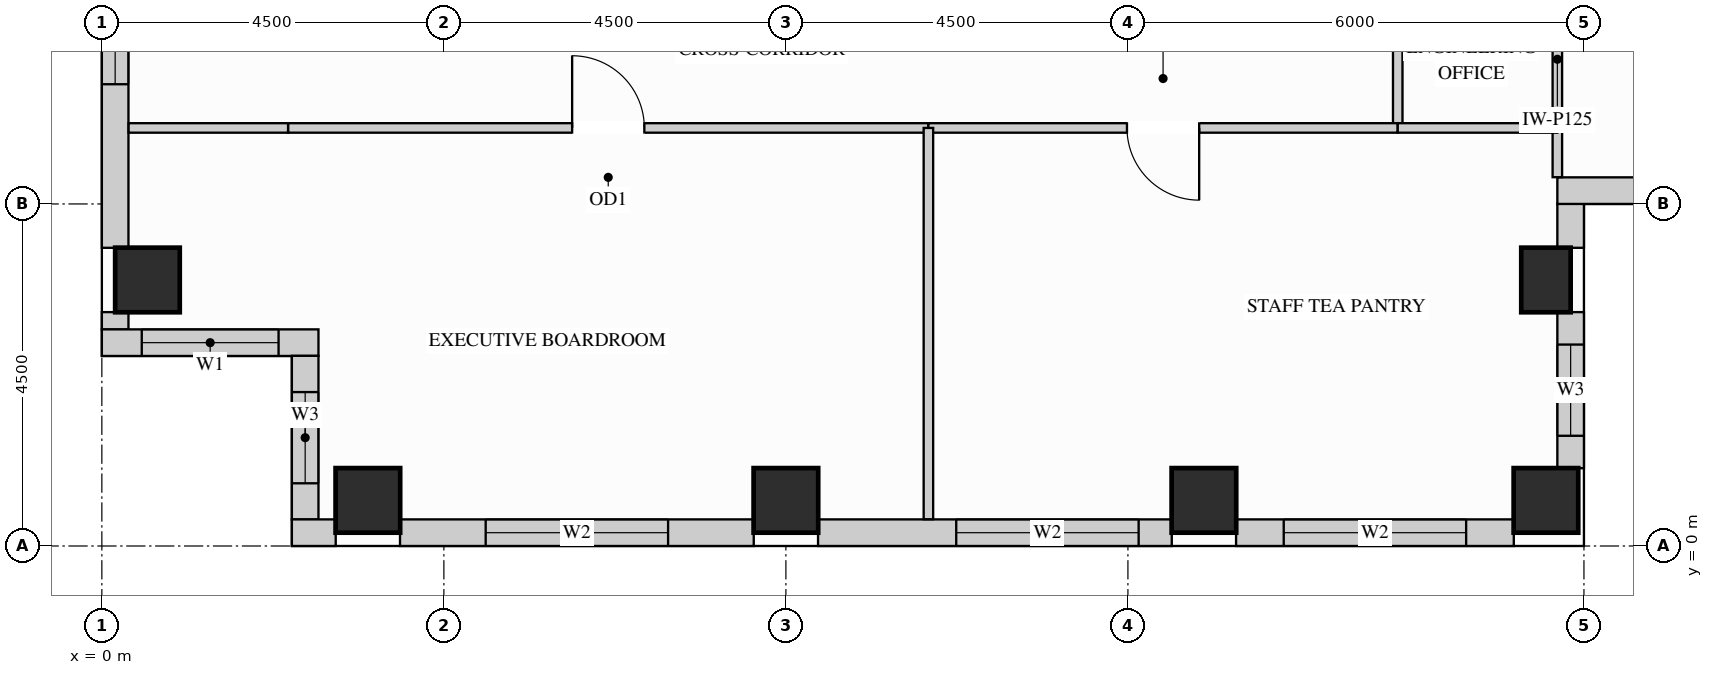
"""IFC4 building model, lengths in metres.
Left out: names, types, materials, properties, quantities, classifications, styles, units other than length and angle.
Written with IfcOpenShell. Run it as: python <this file> out.ifc"""

import sys

from ifc_helpers import new_model, si_unit, direction, frame, frame_2d, origin, origin_2d, place, context, subcontext, project, spatial, rectangle, extrude, source, transform, mapped, element, fill, save


model = new_model("IFC4")
c1 = context("Model", 3, precision=1e-05, world=origin(), true_north=direction((0.0, 1.0)))
c2 = subcontext(c1, "Body", "Model", "MODEL_VIEW")
j1 = project(units=[si_unit("LENGTHUNIT", "METRE"), si_unit("PLANEANGLEUNIT", "RADIAN")], contexts=[c1])
p1 = place(None, origin())
s1 = spatial("IfcSite", under=j1, at=p1, CompositionType="ELEMENT")
p2 = place(p1, origin())
s2 = spatial("IfcBuilding", under=s1, at=p2, CompositionType="ELEMENT")
p3 = place(p2, frame((0.0, 0.0, 216.0)))
s3 = spatial("IfcBuildingStorey", under=s2, at=p3, CompositionType="ELEMENT", Elevation=216.0)
m1 = source(origin(), c2, "Body", "SweptSolid", [
    extrude(rectangle(XDim=0.65, YDim=0.85, at=origin_2d()), origin(), (0.0, 0.0, 1.0), 3.4),
])
p4 = place(p3, frame((19.0, 3.5, 0.0), z_axis=(0.0, 0.0, 1.0), x_axis=(1.0, 0.0, 0.0)))
e1 = element("IfcColumn", 1, at=p4, inside=s3, PredefinedType="COLUMN", context=c2, shape_type="MappedRepresentation", body=[
    mapped(m1, transform((0.0, 0.0, 0.0), x_axis=(1.0, 0.0, 0.0), y_axis=(0.0, 1.0, 0.0), z_axis=(0.0, 0.0, 1.0))),
])
m2 = source(origin(), c2, "Body", "SweptSolid", [
    extrude(rectangle(XDim=0.85, YDim=0.85, at=origin_2d()), origin(), (0.0, 0.0, 1.0), 3.4),
])
for number, where, z_axis, x_axis in (
    (2, (14.5, 0.6, 0.0), (0.0, 0.0, 1.0), (1.0, 0.0, 0.0)),
    (3, (19.0, 0.6, 0.0), (0.0, 0.0, 1.0), (1.0, 0.0, 0.0)),
    (4, (3.5, 0.6, 0.0), (0.0, 0.0, 1.0), (1.0, 0.0, 0.0)),
    (5, (9.0, 0.6, 0.0), (0.0, 0.0, 1.0), (1.0, 0.0, 0.0)),
    (6, (0.6, 3.5, 0.0), (0.0, 0.0, 1.0), (1.0, 0.0, 0.0)),
):
    element("IfcColumn", number, at=place(p3, frame(where, z_axis=z_axis, x_axis=x_axis)), inside=s3, PredefinedType="COLUMN", context=c2, shape_type="MappedRepresentation", body=[
        mapped(m2, transform((0.0, 0.0, 0.0), x_axis=(1.0, 0.0, 0.0), y_axis=(0.0, 1.0, 0.0), z_axis=(0.0, 0.0, 1.0))),
    ])
p5 = place(p3, frame((0.175, 8.077, 0.0), z_axis=(0.0, 0.0, 1.0), x_axis=(0.0, -1.0, 0.0)))
e7 = element("IfcWall", 7, at=p5, inside=s3, PredefinedType="SOLIDWALL", context=c2, shape_type="SweptSolid", body=[
    extrude(rectangle(XDim=4.154, YDim=0.35, at=frame_2d((2.077, 0.0))), origin(), (0.0, 0.0, 1.0), 3.385),
])
p6 = place(p5, frame((0.802, 0.0, 0.78)))
e8 = element("IfcOpeningElement", 8, at=p6, cuts=e7, PredefinedType="OPENING", context=c2, shape_type="SweptSolid", body=[
    extrude(rectangle(XDim=1.2, YDim=2.1, at=frame_2d((0.6, 1.05))), frame((0.0, 0.185, 0.0), z_axis=(0.0, -1.0, 0.0), x_axis=(1.0, 0.0, 0.0)), (0.0, 0.0, 1.0), 0.37),
])
m3 = source(origin(), c2, "Body", "SweptSolid", [
    extrude(rectangle(XDim=0.229, YDim=0.35, at=frame_2d((0.115, 0.0))), origin(), (0.0, 0.0, 1.0), 3.385),
])
p7 = place(p3, frame((0.175, 3.077, 0.0), z_axis=(0.0, 0.0, 1.0), x_axis=(0.0, -1.0, 0.0)))
e9 = element("IfcWall", 9, at=p7, inside=s3, PredefinedType="SOLIDWALL", context=c2, shape_type="MappedRepresentation", body=[
    mapped(m3, transform((0.0, 0.0, 0.0), x_axis=(1.0, 0.0, 0.0), y_axis=(0.0, 1.0, 0.0), z_axis=(0.0, 0.0, 1.0))),
])
p8 = place(p3, frame((0.0, 2.675, 0.0), z_axis=(0.0, 0.0, 1.0), x_axis=(1.0, 0.0, 0.0)))
e10 = element("IfcWall", 10, at=p8, inside=s3, PredefinedType="SOLIDWALL", context=c2, shape_type="SweptSolid", body=[
    extrude(rectangle(XDim=2.85, YDim=0.35, at=frame_2d((1.425, 0.0))), origin(), (0.0, 0.0, 1.0), 3.385),
])
p9 = place(p8, frame((0.525, 0.0, 0.78)))
e11 = element("IfcOpeningElement", 11, at=p9, cuts=e10, PredefinedType="OPENING", context=c2, shape_type="SweptSolid", body=[
    extrude(rectangle(XDim=1.8, YDim=2.1, at=frame_2d((0.9, 1.05))), frame((0.0, 0.185, 0.0), z_axis=(0.0, -1.0, 0.0), x_axis=(1.0, 0.0, 0.0)), (0.0, 0.0, 1.0), 0.37),
])
p10 = place(p3, frame((2.675, 2.502, 0.0), z_axis=(0.0, 0.0, 1.0), x_axis=(0.0, -1.0, 0.0)))
e12 = element("IfcWall", 12, at=p10, inside=s3, PredefinedType="SOLIDWALL", context=c2, shape_type="SweptSolid", body=[
    extrude(rectangle(XDim=2.154, YDim=0.35, at=frame_2d((1.077, 0.0))), origin(), (0.0, 0.0, 1.0), 3.385),
])
p11 = place(p10, frame((0.477, 0.0, 0.78)))
e13 = element("IfcOpeningElement", 13, at=p11, cuts=e12, PredefinedType="OPENING", context=c2, shape_type="SweptSolid", body=[
    extrude(rectangle(XDim=1.2, YDim=2.1, at=frame_2d((0.6, 1.05))), frame((0.0, 0.185, 0.0), z_axis=(0.0, -1.0, 0.0), x_axis=(1.0, 0.0, 0.0)), (0.0, 0.0, 1.0), 0.37),
])
m4 = source(origin(), c2, "Body", "SweptSolid", [
    extrude(rectangle(XDim=0.577, YDim=0.35, at=frame_2d((0.289, 0.0))), origin(), (0.0, 0.0, 1.0), 3.385),
])
p12 = place(p3, frame((2.5, 0.175, 0.0), z_axis=(0.0, 0.0, 1.0), x_axis=(1.0, 0.0, 0.0)))
e14 = element("IfcWall", 14, at=p12, inside=s3, PredefinedType="SOLIDWALL", context=c2, shape_type="MappedRepresentation", body=[
    mapped(m4, transform((0.0, 0.0, 0.0), x_axis=(1.0, 0.0, 0.0), y_axis=(0.0, 1.0, 0.0), z_axis=(0.0, 0.0, 1.0))),
])
p13 = place(p3, frame((3.923, 0.175, 0.0), z_axis=(0.0, 0.0, 1.0), x_axis=(1.0, 0.0, 0.0)))
e15 = element("IfcWall", 15, at=p13, inside=s3, PredefinedType="SOLIDWALL", context=c2, shape_type="SweptSolid", body=[
    extrude(rectangle(XDim=4.654, YDim=0.35, at=frame_2d((2.327, 0.0))), origin(), (0.0, 0.0, 1.0), 3.385),
])
p14 = place(p13, frame((1.127, 0.0, 0.78)))
e16 = element("IfcOpeningElement", 16, at=p14, cuts=e15, PredefinedType="OPENING", context=c2, shape_type="SweptSolid", body=[
    extrude(rectangle(XDim=2.4, YDim=2.1, at=frame_2d((1.2, 1.05))), frame((0.0, 0.185, 0.0), z_axis=(0.0, -1.0, 0.0), x_axis=(1.0, 0.0, 0.0)), (0.0, 0.0, 1.0), 0.37),
])
p15 = place(p3, frame((9.423, 0.175, 0.0), z_axis=(0.0, 0.0, 1.0), x_axis=(1.0, 0.0, 0.0)))
e17 = element("IfcWall", 17, at=p15, inside=s3, PredefinedType="SOLIDWALL", context=c2, shape_type="SweptSolid", body=[
    extrude(rectangle(XDim=4.654, YDim=0.35, at=frame_2d((2.327, 0.0))), origin(), (0.0, 0.0, 1.0), 3.385),
])
p16 = place(p15, frame((1.818, 0.0, 0.78)))
e18 = element("IfcOpeningElement", 18, at=p16, cuts=e17, PredefinedType="OPENING", context=c2, shape_type="SweptSolid", body=[
    extrude(rectangle(XDim=2.4, YDim=2.1, at=frame_2d((1.2, 1.05))), frame((0.0, 0.185, 0.0), z_axis=(0.0, -1.0, 0.0), x_axis=(1.0, 0.0, 0.0)), (0.0, 0.0, 1.0), 0.37),
])
p17 = place(p3, frame((14.923, 0.175, 0.0), z_axis=(0.0, 0.0, 1.0), x_axis=(1.0, 0.0, 0.0)))
e19 = element("IfcWall", 19, at=p17, inside=s3, PredefinedType="SOLIDWALL", context=c2, shape_type="SweptSolid", body=[
    extrude(rectangle(XDim=3.654, YDim=0.35, at=frame_2d((1.827, 0.0))), origin(), (0.0, 0.0, 1.0), 3.385),
])
p18 = place(p17, frame((0.627, 0.0, 0.78)))
e20 = element("IfcOpeningElement", 20, at=p18, cuts=e19, PredefinedType="OPENING", context=c2, shape_type="SweptSolid", body=[
    extrude(rectangle(XDim=2.4, YDim=2.1, at=frame_2d((1.2, 1.05))), frame((0.0, 0.185, 0.0), z_axis=(0.0, -1.0, 0.0), x_axis=(1.0, 0.0, 0.0)), (0.0, 0.0, 1.0), 0.37),
])
p19 = place(p3, frame((19.325, 1.023, 0.0), z_axis=(0.0, 0.0, 1.0), x_axis=(0.0, 1.0, 0.0)))
e21 = element("IfcWall", 21, at=p19, inside=s3, PredefinedType="SOLIDWALL", context=c2, shape_type="SweptSolid", body=[
    extrude(rectangle(XDim=2.054, YDim=0.35, at=frame_2d((1.027, 0.0))), origin(), (0.0, 0.0, 1.0), 2.619),
])
p20 = place(p19, frame((0.427, 0.0, 0.78)))
e22 = element("IfcOpeningElement", 22, at=p20, cuts=e21, PredefinedType="OPENING", context=c2, shape_type="SweptSolid", body=[
    extrude(rectangle(XDim=1.2, YDim=1.659, at=frame_2d((0.6, 0.83))), frame((0.0, 0.185, 0.0), z_axis=(0.0, -1.0, 0.0), x_axis=(1.0, 0.0, 0.0)), (0.0, 0.0, 1.0), 0.37),
])
m5 = source(origin(), c2, "Body", "SweptSolid", [
    extrude(rectangle(XDim=0.579, YDim=0.35, at=frame_2d((0.29, 0.0))), origin(), (0.0, 0.0, 1.0), 2.773),
])
p21 = place(p3, frame((19.325, 3.923, 0.0), z_axis=(0.0, 0.0, 1.0), x_axis=(0.0, 1.0, 0.0)))
e23 = element("IfcWall", 23, at=p21, inside=s3, PredefinedType="SOLIDWALL", context=c2, shape_type="MappedRepresentation", body=[
    mapped(m5, transform((0.0, 0.0, 0.0), x_axis=(1.0, 0.0, 0.0), y_axis=(0.0, 1.0, 0.0), z_axis=(0.0, 0.0, 1.0))),
])
p22 = place(p3, frame((19.15, 4.675, 0.0), z_axis=(0.0, 0.0, 1.0), x_axis=(1.0, 0.0, 0.0)))
e24 = element("IfcWall", 24, at=p22, inside=s3, PredefinedType="SOLIDWALL", context=c2, shape_type="SweptSolid", body=[
    extrude(rectangle(XDim=15.6, YDim=0.35, at=frame_2d((7.8, 0.0))), origin(), (0.0, 0.0, 1.0), 3.385),
])
p23 = place(p22, frame((1.73, 0.0, 0.78)))
e25 = element("IfcOpeningElement", 25, at=p23, cuts=e24, PredefinedType="OPENING", context=c2, shape_type="SweptSolid", body=[
    extrude(rectangle(XDim=1.5, YDim=2.0, at=frame_2d((0.75, 1.0))), frame((0.0, 0.185, 0.0), z_axis=(0.0, -1.0, 0.0), x_axis=(1.0, 0.0, 0.0)), (0.0, 0.0, 1.0), 0.37),
])
p24 = place(p22, frame((4.64, 0.0, 0.78)))
e26 = element("IfcOpeningElement", 26, at=p24, cuts=e24, PredefinedType="OPENING", context=c2, shape_type="SweptSolid", body=[
    extrude(rectangle(XDim=1.5, YDim=2.0, at=frame_2d((0.75, 1.0))), frame((0.0, 0.185, 0.0), z_axis=(0.0, -1.0, 0.0), x_axis=(1.0, 0.0, 0.0)), (0.0, 0.0, 1.0), 0.37),
])
p25 = place(p22, frame((9.46, 0.0, 0.78)))
e27 = element("IfcOpeningElement", 27, at=p25, cuts=e24, PredefinedType="OPENING", context=c2, shape_type="SweptSolid", body=[
    extrude(rectangle(XDim=1.5, YDim=2.0, at=frame_2d((0.75, 1.0))), frame((0.0, 0.185, 0.0), z_axis=(0.0, -1.0, 0.0), x_axis=(1.0, 0.0, 0.0)), (0.0, 0.0, 1.0), 0.37),
])
p26 = place(p22, frame((12.37, 0.0, 0.78)))
e28 = element("IfcOpeningElement", 28, at=p26, cuts=e24, PredefinedType="OPENING", context=c2, shape_type="SweptSolid", body=[
    extrude(rectangle(XDim=1.5, YDim=2.0, at=frame_2d((0.75, 1.0))), frame((0.0, 0.185, 0.0), z_axis=(0.0, -1.0, 0.0), x_axis=(1.0, 0.0, 0.0)), (0.0, 0.0, 1.0), 0.37),
])
m6 = source(origin(), c2, "Body", "SweptSolid", [
    extrude(rectangle(XDim=3.198, YDim=0.125, at=frame_2d((1.599, 0.0))), origin(), (0.0, 0.0, 1.0), 2.773),
])
p27 = place(p3, frame((19.15, 4.852, 0.0), z_axis=(0.0, 0.0, 1.0), x_axis=(0.0, 1.0, 0.0)))
e29 = element("IfcWall", 29, at=p27, inside=s3, PredefinedType="PARTITIONING", context=c2, shape_type="MappedRepresentation", body=[
    mapped(m6, transform((0.0, 0.0, 0.0), x_axis=(1.0, 0.0, 0.0), y_axis=(0.0, 1.0, 0.0), z_axis=(0.0, 0.0, 1.0))),
])
p28 = place(p3, frame((17.05, 5.5, 0.0), z_axis=(0.0, 0.0, 1.0), x_axis=(0.0, 1.0, 0.0)))
e30 = element("IfcWall", 30, at=p28, inside=s3, PredefinedType="PARTITIONING", context=c2, shape_type="SweptSolid", body=[
    extrude(rectangle(XDim=5.1, YDim=0.125, at=frame_2d((2.55, 0.0))), origin(), (0.0, 0.0, 1.0), 3.385),
])
p29 = place(p28, frame((2.075, 0.0, 0.0)))
e31 = element("IfcOpeningElement", 31, at=p29, cuts=e30, PredefinedType="OPENING", context=c2, shape_type="SweptSolid", body=[
    extrude(rectangle(XDim=0.95, YDim=2.15, at=frame_2d((0.475, 1.075))), frame((0.0, 0.073, 0.0), z_axis=(0.0, -1.0, 0.0), x_axis=(1.0, 0.0, 0.0)), (0.0, 0.0, 1.0), 0.145),
])
p30 = place(p3, frame((2.45, 5.5, 0.0), z_axis=(0.0, 0.0, 1.0), x_axis=(1.0, 0.0, 0.0)))
e32 = element("IfcWall", 32, at=p30, inside=s3, PredefinedType="PARTITIONING", context=c2, shape_type="SweptSolid", body=[
    extrude(rectangle(XDim=8.425, YDim=0.125, at=frame_2d((4.212, 0.0))), origin(), (0.0, 0.0, 1.0), 3.385),
])
p31 = place(p30, frame((3.738, 0.0, 0.0)))
e33 = element("IfcOpeningElement", 33, at=p31, cuts=e32, PredefinedType="OPENING", context=c2, shape_type="SweptSolid", body=[
    extrude(rectangle(XDim=0.95, YDim=2.15, at=frame_2d((0.475, 1.075))), frame((0.0, 0.073, 0.0), z_axis=(0.0, -1.0, 0.0), x_axis=(1.0, 0.0, 0.0)), (0.0, 0.0, 1.0), 0.145),
])
p32 = place(p3, frame((10.875, 5.5, 0.0), z_axis=(0.0, 0.0, 1.0), x_axis=(1.0, 0.0, 0.0)))
e34 = element("IfcWall", 34, at=p32, inside=s3, PredefinedType="PARTITIONING", context=c2, shape_type="SweptSolid", body=[
    extrude(rectangle(XDim=6.175, YDim=0.125, at=frame_2d((3.087, 0.0))), origin(), (0.0, 0.0, 1.0), 3.385),
])
p33 = place(p32, frame((2.613, 0.0, 0.0)))
e35 = element("IfcOpeningElement", 35, at=p33, cuts=e34, PredefinedType="OPENING", context=c2, shape_type="SweptSolid", body=[
    extrude(rectangle(XDim=0.95, YDim=2.15, at=frame_2d((0.475, 1.075))), frame((0.0, 0.073, 0.0), z_axis=(0.0, -1.0, 0.0), x_axis=(1.0, 0.0, 0.0)), (0.0, 0.0, 1.0), 0.145),
])
m7 = source(origin(), c2, "Body", "SweptSolid", [
    extrude(rectangle(XDim=2.098, YDim=0.125, at=frame_2d((1.049, 0.0))), origin(), (0.0, 0.0, 1.0), 3.385),
])
p34 = place(p3, frame((0.352, 5.5, 0.0), z_axis=(0.0, 0.0, 1.0), x_axis=(1.0, 0.0, 0.0)))
e36 = element("IfcWall", 36, at=p34, inside=s3, PredefinedType="PARTITIONING", context=c2, shape_type="MappedRepresentation", body=[
    mapped(m7, transform((0.0, 0.0, 0.0), x_axis=(1.0, 0.0, 0.0), y_axis=(0.0, 1.0, 0.0), z_axis=(0.0, 0.0, 1.0))),
])
m8 = source(origin(), c2, "Body", "SweptSolid", [
    extrude(rectangle(XDim=2.1, YDim=0.125, at=frame_2d((1.05, 0.0))), origin(), (0.0, 0.0, 1.0), 3.385),
])
p35 = place(p3, frame((17.05, 5.5, 0.0), z_axis=(0.0, 0.0, 1.0), x_axis=(1.0, 0.0, 0.0)))
e37 = element("IfcWall", 37, at=p35, inside=s3, PredefinedType="PARTITIONING", context=c2, shape_type="MappedRepresentation", body=[
    mapped(m8, transform((0.0, 0.0, 0.0), x_axis=(1.0, 0.0, 0.0), y_axis=(0.0, 1.0, 0.0), z_axis=(0.0, 0.0, 1.0))),
])
m9 = source(origin(), c2, "Body", "SweptSolid", [
    extrude(rectangle(XDim=5.148, YDim=0.125, at=frame_2d((2.574, 0.0))), origin(), (0.0, 0.0, 1.0), 3.385),
])
p36 = place(p3, frame((10.875, 0.352, 0.0), z_axis=(0.0, 0.0, 1.0), x_axis=(0.0, 1.0, 0.0)))
e38 = element("IfcWall", 38, at=p36, inside=s3, PredefinedType="PARTITIONING", context=c2, shape_type="MappedRepresentation", body=[
    mapped(m9, transform((0.0, 0.0, 0.0), x_axis=(1.0, 0.0, 0.0), y_axis=(0.0, 1.0, 0.0), z_axis=(0.0, 0.0, 1.0))),
])
m10 = source(origin(), c2, "Body", "SweptSolid", [
    extrude(rectangle(XDim=0.95, YDim=2.15, at=frame_2d((0.475, 1.075))), frame((0.0, 0.025, 0.0), z_axis=(0.0, -1.0, 0.0), x_axis=(1.0, 0.0, 0.0)), (0.0, 0.0, 1.0), 0.05),
])
p37 = place(p31, origin())
e39 = element("IfcDoor", 39, at=p37, inside=s3, OperationType="SINGLE_SWING_LEFT", PredefinedType="DOOR", context=c2, shape_type="MappedRepresentation", body=[
    mapped(m10, transform((0.0, 0.0, 0.0), x_axis=(1.0, 0.0, 0.0), y_axis=(0.0, 1.0, 0.0), z_axis=(0.0, 0.0, 1.0))),
])
fill(e33, e39)
p38 = place(p33, origin())
e40 = element("IfcDoor", 40, at=p38, inside=s3, OperationType="SINGLE_SWING_RIGHT", PredefinedType="DOOR", context=c2, shape_type="MappedRepresentation", body=[
    mapped(m10, transform((0.0, 0.0, 0.0), x_axis=(1.0, 0.0, 0.0), y_axis=(0.0, 1.0, 0.0), z_axis=(0.0, 0.0, 1.0))),
])
fill(e35, e40)
m11 = source(origin(), c2, "Body", "SweptSolid", [
    extrude(rectangle(XDim=1.8, YDim=2.1, at=frame_2d((0.9, 1.05))), frame((0.0, 0.03, 0.0), z_axis=(0.0, -1.0, 0.0), x_axis=(1.0, 0.0, 0.0)), (0.0, 0.0, 1.0), 0.06),
])
p39 = place(p9, origin())
e41 = element("IfcWindow", 41, at=p39, inside=s3, PartitioningType="SINGLE_PANEL", PredefinedType="WINDOW", context=c2, shape_type="MappedRepresentation", body=[
    mapped(m11, transform((0.0, 0.0, 0.0), x_axis=(1.0, 0.0, 0.0), y_axis=(0.0, 1.0, 0.0), z_axis=(0.0, 0.0, 1.0))),
])
fill(e11, e41)
m12 = source(origin(), c2, "Body", "SweptSolid", [
    extrude(rectangle(XDim=2.4, YDim=2.1, at=frame_2d((1.2, 1.05))), frame((0.0, 0.03, 0.0), z_axis=(0.0, -1.0, 0.0), x_axis=(1.0, 0.0, 0.0)), (0.0, 0.0, 1.0), 0.06),
])
p40 = place(p14, origin())
e42 = element("IfcWindow", 42, at=p40, inside=s3, PartitioningType="SINGLE_PANEL", PredefinedType="WINDOW", context=c2, shape_type="MappedRepresentation", body=[
    mapped(m12, transform((0.0, 0.0, 0.0), x_axis=(1.0, 0.0, 0.0), y_axis=(0.0, 1.0, 0.0), z_axis=(0.0, 0.0, 1.0))),
])
fill(e16, e42)
p41 = place(p16, origin())
e43 = element("IfcWindow", 43, at=p41, inside=s3, PartitioningType="SINGLE_PANEL", PredefinedType="WINDOW", context=c2, shape_type="MappedRepresentation", body=[
    mapped(m12, transform((0.0, 0.0, 0.0), x_axis=(1.0, 0.0, 0.0), y_axis=(0.0, 1.0, 0.0), z_axis=(0.0, 0.0, 1.0))),
])
fill(e18, e43)
p42 = place(p18, origin())
e44 = element("IfcWindow", 44, at=p42, inside=s3, PartitioningType="SINGLE_PANEL", PredefinedType="WINDOW", context=c2, shape_type="MappedRepresentation", body=[
    mapped(m12, transform((0.0, 0.0, 0.0), x_axis=(1.0, 0.0, 0.0), y_axis=(0.0, 1.0, 0.0), z_axis=(0.0, 0.0, 1.0))),
])
fill(e20, e44)
m13 = source(origin(), c2, "Body", "SweptSolid", [
    extrude(rectangle(XDim=1.2, YDim=2.1, at=frame_2d((0.6, 1.05))), frame((0.0, 0.03, 0.0), z_axis=(0.0, -1.0, 0.0), x_axis=(1.0, 0.0, 0.0)), (0.0, 0.0, 1.0), 0.06),
])
p43 = place(p6, origin())
e45 = element("IfcWindow", 45, at=p43, inside=s3, PartitioningType="SINGLE_PANEL", PredefinedType="WINDOW", context=c2, shape_type="MappedRepresentation", body=[
    mapped(m13, transform((0.0, 0.0, 0.0), x_axis=(1.0, 0.0, 0.0), y_axis=(0.0, 1.0, 0.0), z_axis=(0.0, 0.0, 1.0))),
])
fill(e8, e45)
p44 = place(p11, origin())
e46 = element("IfcWindow", 46, at=p44, inside=s3, PartitioningType="SINGLE_PANEL", PredefinedType="WINDOW", context=c2, shape_type="MappedRepresentation", body=[
    mapped(m13, transform((0.0, 0.0, 0.0), x_axis=(1.0, 0.0, 0.0), y_axis=(0.0, 1.0, 0.0), z_axis=(0.0, 0.0, 1.0))),
])
fill(e13, e46)
m14 = source(origin(), c2, "Body", "SweptSolid", [
    extrude(rectangle(XDim=1.2, YDim=1.659, at=frame_2d((0.6, 0.83))), frame((0.0, 0.03, 0.0), z_axis=(0.0, -1.0, 0.0), x_axis=(1.0, 0.0, 0.0)), (0.0, 0.0, 1.0), 0.06),
])
p45 = place(p20, origin())
e47 = element("IfcWindow", 47, at=p45, inside=s3, PartitioningType="SINGLE_PANEL", PredefinedType="WINDOW", context=c2, shape_type="MappedRepresentation", body=[
    mapped(m14, transform((0.0, 0.0, 0.0), x_axis=(1.0, 0.0, 0.0), y_axis=(0.0, 1.0, 0.0), z_axis=(0.0, 0.0, 1.0))),
])
fill(e22, e47)
save(model, sys.argv[1])
